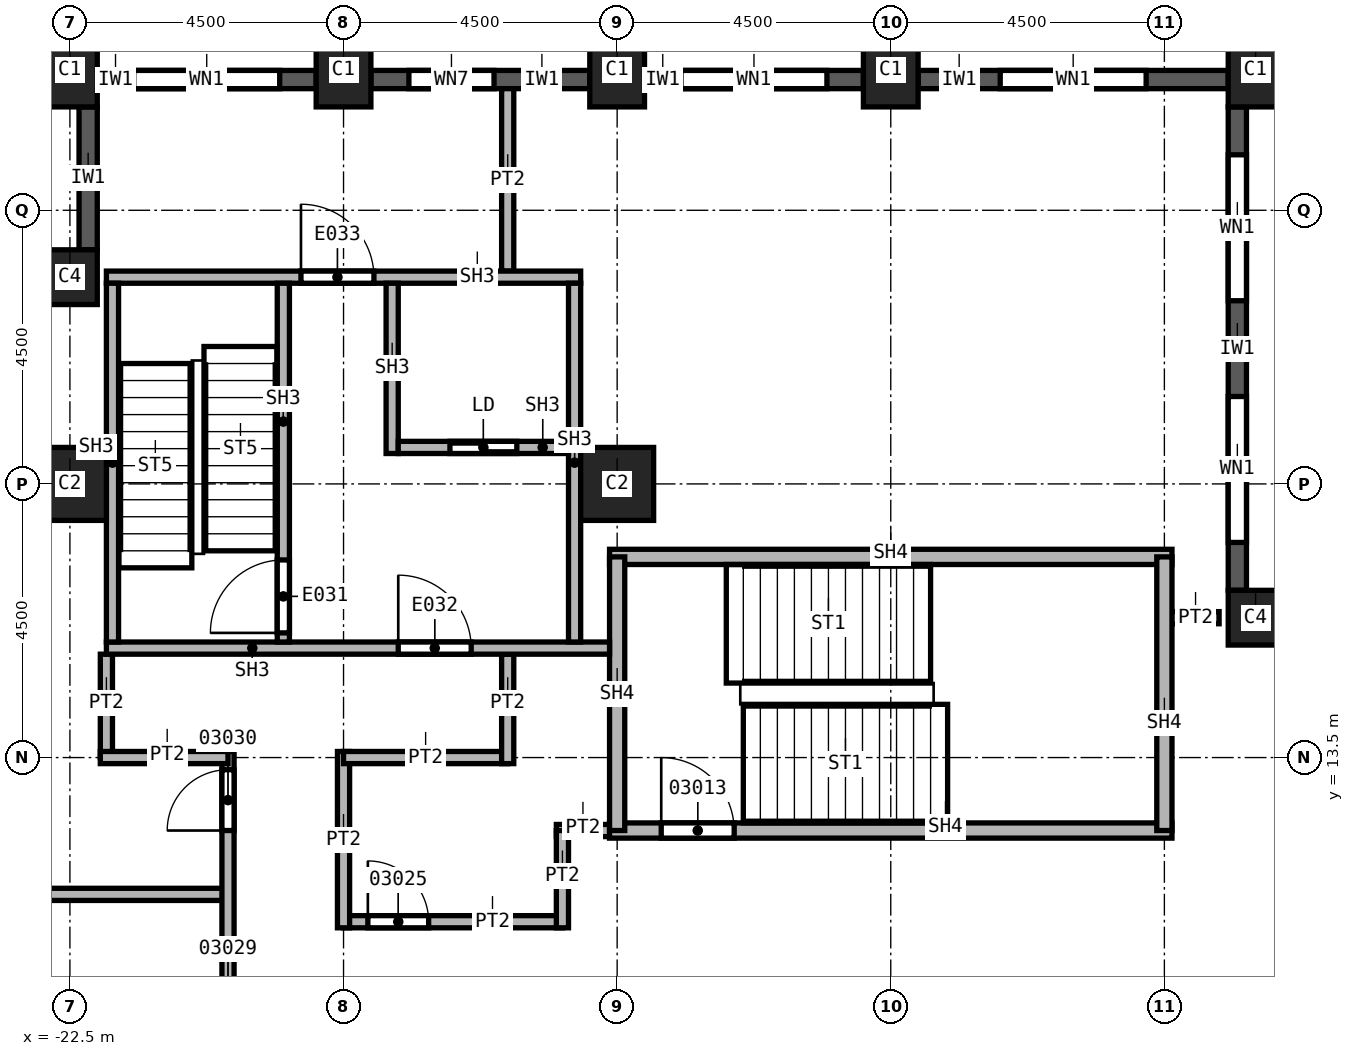
"""IFC4 building model, lengths in metres.
Left out: names, types, materials, properties, quantities, classifications, styles, units other than length and angle.
Written with IfcOpenShell. Run it as: python <this file> out.ifc"""

import sys

from ifc_helpers import new_model, si_unit, direction, frame, frame_2d, origin, origin_2d, place, context, subcontext, project, spatial, rectangle, extrude, element, fill, save


model = new_model("IFC4")
c1 = context("Model", 3, precision=1e-05, world=origin(), true_north=direction((0.0, 1.0)))
c2 = subcontext(c1, "Body", "Model", "MODEL_VIEW")
j1 = project(units=[si_unit("LENGTHUNIT", "METRE"), si_unit("PLANEANGLEUNIT", "RADIAN")], contexts=[c1])
p1 = place(None, origin())
s1 = spatial("IfcSite", under=j1, at=p1, CompositionType="ELEMENT")
p2 = place(p1, origin())
s2 = spatial("IfcBuilding", under=s1, at=p2, CompositionType="ELEMENT")
p3 = place(p2, frame((0.0, 0.0, 92.0)))
s3 = spatial("IfcBuildingStorey", under=s2, at=p3, CompositionType="ELEMENT", Elevation=92.0)
for number, where, z_axis, x_axis in (
    (1, (-13.5, 18.0, 0.0), (0.0, 0.0, 1.0), (1.0, 0.0, 0.0)),
    (2, (-22.5, 18.0, 0.0), (0.0, 0.0, 1.0), (1.0, 0.0, 0.0)),
):
    element("IfcColumn", number, at=place(p3, frame(where, z_axis=z_axis, x_axis=x_axis)), inside=s3, PredefinedType="COLUMN", context=c2, shape_type="SweptSolid", body=[
        extrude(rectangle(XDim=1.2, YDim=1.2, at=origin_2d()), origin(), (0.0, 0.0, 1.0), 3.7),
    ])
for number, where, z_axis, x_axis in (
    (3, (-3.0, 24.8, 0.0), (0.0, 0.0, 1.0), (1.0, 0.0, 0.0)),
    (4, (-9.0, 24.8, 0.0), (0.0, 0.0, 1.0), (1.0, 0.0, 0.0)),
    (5, (-13.5, 24.8, 0.0), (0.0, 0.0, 1.0), (1.0, 0.0, 0.0)),
    (6, (-18.0, 24.8, 0.0), (0.0, 0.0, 1.0), (1.0, 0.0, 0.0)),
    (7, (-22.5, 24.8, 0.0), (0.0, 0.0, 1.0), (1.0, 0.0, 0.0)),
):
    element("IfcColumn", number, at=place(p3, frame(where, z_axis=z_axis, x_axis=x_axis)), inside=s3, PredefinedType="COLUMN", context=c2, shape_type="SweptSolid", body=[
        extrude(rectangle(XDim=0.9, YDim=1.2, at=origin_2d()), origin(), (0.0, 0.0, 1.0), 3.7),
    ])
for number, where, z_axis, x_axis in (
    (8, (-3.0, 15.8, 0.0), (0.0, 0.0, 1.0), (1.0, 0.0, 0.0)),
    (9, (-22.5, 21.4, 0.0), (0.0, 0.0, 1.0), (1.0, 0.0, 0.0)),
):
    element("IfcColumn", number, at=place(p3, frame(where, z_axis=z_axis, x_axis=x_axis)), inside=s3, PredefinedType="COLUMN", context=c2, shape_type="SweptSolid", body=[
        extrude(rectangle(XDim=0.9, YDim=0.9, at=origin_2d()), origin(), (0.0, 0.0, 1.0), 3.7),
    ])
p4 = place(p3, frame((-22.2, 24.2, 0.0), z_axis=(0.0, 0.0, 1.0), x_axis=(0.0, -1.0, 0.0)))
e10 = element("IfcWall", 10, at=p4, inside=s3, PredefinedType="SOLIDWALL", context=c2, shape_type="SweptSolid", body=[
    extrude(rectangle(XDim=2.35, YDim=0.3, at=frame_2d((1.175, 0.0))), origin(), (0.0, 0.0, 1.0), 3.1),
])
p5 = place(p3, frame((-3.3, 16.25, 0.0), z_axis=(0.0, 0.0, 1.0), x_axis=(0.0, 1.0, 0.0)))
e11 = element("IfcWall", 11, at=p5, inside=s3, PredefinedType="SOLIDWALL", context=c2, shape_type="SweptSolid", body=[
    extrude(rectangle(XDim=7.95, YDim=0.3, at=frame_2d((3.975, 0.0))), origin(), (0.0, 0.0, 1.0), 3.1),
])
p6 = place(p5, frame((0.788, 0.0, 0.8)))
e12 = element("IfcOpeningElement", 12, at=p6, cuts=e11, PredefinedType="OPENING", context=c2, shape_type="SweptSolid", body=[
    extrude(rectangle(XDim=2.4, YDim=1.95, at=frame_2d((1.2, 0.975))), frame((0.0, 0.15, 0.0), z_axis=(0.0, -1.0, 0.0), x_axis=(1.0, 0.0, 0.0)), (0.0, 0.0, 1.0), 0.3),
])
p7 = place(p5, frame((4.762, 0.0, 0.8)))
e13 = element("IfcOpeningElement", 13, at=p7, cuts=e11, PredefinedType="OPENING", context=c2, shape_type="SweptSolid", body=[
    extrude(rectangle(XDim=2.4, YDim=1.95, at=frame_2d((1.2, 0.975))), frame((0.0, 0.15, 0.0), z_axis=(0.0, -1.0, 0.0), x_axis=(1.0, 0.0, 0.0)), (0.0, 0.0, 1.0), 0.3),
])
p8 = place(p3, frame((-3.45, 24.65, 0.0), z_axis=(0.0, 0.0, 1.0), x_axis=(-1.0, 0.0, 0.0)))
e14 = element("IfcWall", 14, at=p8, inside=s3, PredefinedType="SOLIDWALL", context=c2, shape_type="SweptSolid", body=[
    extrude(rectangle(XDim=5.1, YDim=0.3, at=frame_2d((2.55, 0.0))), origin(), (0.0, 0.0, 1.0), 3.1),
])
p9 = place(p8, frame((1.35, 0.0, 0.8)))
e15 = element("IfcOpeningElement", 15, at=p9, cuts=e14, PredefinedType="OPENING", context=c2, shape_type="SweptSolid", body=[
    extrude(rectangle(XDim=2.4, YDim=1.95, at=frame_2d((1.2, 0.975))), frame((0.0, 0.15, 0.0), z_axis=(0.0, -1.0, 0.0), x_axis=(1.0, 0.0, 0.0)), (0.0, 0.0, 1.0), 0.3),
])
p10 = place(p3, frame((-9.45, 24.65, 0.0), z_axis=(0.0, 0.0, 1.0), x_axis=(-1.0, 0.0, 0.0)))
e16 = element("IfcWall", 16, at=p10, inside=s3, PredefinedType="SOLIDWALL", context=c2, shape_type="SweptSolid", body=[
    extrude(rectangle(XDim=3.6, YDim=0.3, at=frame_2d((1.8, 0.0))), origin(), (0.0, 0.0, 1.0), 3.1),
])
p11 = place(p10, frame((0.6, 0.0, 0.8)))
e17 = element("IfcOpeningElement", 17, at=p11, cuts=e16, PredefinedType="OPENING", context=c2, shape_type="SweptSolid", body=[
    extrude(rectangle(XDim=2.4, YDim=1.95, at=frame_2d((1.2, 0.975))), frame((0.0, 0.15, 0.0), z_axis=(0.0, -1.0, 0.0), x_axis=(1.0, 0.0, 0.0)), (0.0, 0.0, 1.0), 0.3),
])
p12 = place(p3, frame((-13.95, 24.65, 0.0), z_axis=(0.0, 0.0, 1.0), x_axis=(-1.0, 0.0, 0.0)))
e18 = element("IfcWall", 18, at=p12, inside=s3, PredefinedType="SOLIDWALL", context=c2, shape_type="SweptSolid", body=[
    extrude(rectangle(XDim=3.6, YDim=0.3, at=frame_2d((1.8, 0.0))), origin(), (0.0, 0.0, 1.0), 3.1),
])
p13 = place(p12, frame((1.575, 0.0, 0.8)))
e19 = element("IfcOpeningElement", 19, at=p13, cuts=e18, PredefinedType="OPENING", context=c2, shape_type="SweptSolid", body=[
    extrude(rectangle(XDim=1.4, YDim=1.95, at=frame_2d((0.7, 0.975))), frame((0.0, 0.15, 0.0), z_axis=(0.0, -1.0, 0.0), x_axis=(1.0, 0.0, 0.0)), (0.0, 0.0, 1.0), 0.3),
])
p14 = place(p3, frame((-18.45, 24.65, 0.0), z_axis=(0.0, 0.0, 1.0), x_axis=(-1.0, 0.0, 0.0)))
e20 = element("IfcWall", 20, at=p14, inside=s3, PredefinedType="SOLIDWALL", context=c2, shape_type="SweptSolid", body=[
    extrude(rectangle(XDim=3.6, YDim=0.3, at=frame_2d((1.8, 0.0))), origin(), (0.0, 0.0, 1.0), 3.1),
])
p15 = place(p14, frame((0.6, 0.0, 0.8)))
e21 = element("IfcOpeningElement", 21, at=p15, cuts=e20, PredefinedType="OPENING", context=c2, shape_type="SweptSolid", body=[
    extrude(rectangle(XDim=2.4, YDim=1.95, at=frame_2d((1.2, 0.975))), frame((0.0, 0.15, 0.0), z_axis=(0.0, -1.0, 0.0), x_axis=(1.0, 0.0, 0.0)), (0.0, 0.0, 1.0), 0.3),
])
p16 = place(p3, frame((-27.1, 11.25, 0.0), z_axis=(0.0, 0.0, 1.0), x_axis=(1.0, 0.0, 0.0)))
e22 = element("IfcWall", 22, at=p16, inside=s3, PredefinedType="PARTITIONING", context=c2, shape_type="SweptSolid", body=[
    extrude(rectangle(XDim=7.2, YDim=0.2, at=frame_2d((3.6, 0.0))), origin(), (0.0, 0.0, 1.0), 3.7),
])
p17 = place(p3, frame((-21.9, 13.5, 0.0), z_axis=(0.0, 0.0, 1.0), x_axis=(0.0, 1.0, 0.0)))
e23 = element("IfcWall", 23, at=p17, inside=s3, PredefinedType="PARTITIONING", context=c2, shape_type="SweptSolid", body=[
    extrude(rectangle(XDim=1.7, YDim=0.2, at=frame_2d((0.85, 0.0))), origin(), (0.0, 0.0, 1.0), 3.7),
])
p18 = place(p3, frame((-19.9, 3.65, 0.0), z_axis=(0.0, 0.0, 1.0), x_axis=(0.0, 1.0, 0.0)))
e24 = element("IfcWall", 24, at=p18, inside=s3, PredefinedType="PARTITIONING", context=c2, shape_type="SweptSolid", body=[
    extrude(rectangle(XDim=9.95, YDim=0.2, at=frame_2d((4.975, 0.0))), origin(), (0.0, 0.0, 1.0), 3.7),
])
p19 = place(p18, frame((5.2, 0.0, 0.0)))
e25 = element("IfcOpeningElement", 25, at=p19, cuts=e24, PredefinedType="OPENING", context=c2, shape_type="SweptSolid", body=[
    extrude(rectangle(XDim=1.0, YDim=2.1, at=frame_2d((0.5, 1.05))), frame((0.0, 0.1, 0.0), z_axis=(0.0, -1.0, 0.0), x_axis=(1.0, 0.0, 0.0)), (0.0, 0.0, 1.0), 0.2),
])
p20 = place(p18, frame((8.65, 0.0, 0.0)))
e26 = element("IfcOpeningElement", 26, at=p20, cuts=e24, PredefinedType="OPENING", context=c2, shape_type="SweptSolid", body=[
    extrude(rectangle(XDim=1.0, YDim=2.1, at=frame_2d((0.5, 1.05))), frame((0.0, 0.1, 0.0), z_axis=(0.0, -1.0, 0.0), x_axis=(1.0, 0.0, 0.0)), (0.0, 0.0, 1.0), 0.2),
])
p21 = place(p3, frame((-19.9, 13.5, 0.0), z_axis=(0.0, 0.0, 1.0), x_axis=(-1.0, 0.0, 0.0)))
e27 = element("IfcWall", 27, at=p21, inside=s3, PredefinedType="PARTITIONING", context=c2, shape_type="SweptSolid", body=[
    extrude(rectangle(XDim=2.1, YDim=0.2, at=frame_2d((1.05, 0.0))), origin(), (0.0, 0.0, 1.0), 3.7),
])
p22 = place(p3, frame((-18.0, 10.8, 0.0), z_axis=(0.0, 0.0, 1.0), x_axis=(1.0, 0.0, 0.0)))
e28 = element("IfcWall", 28, at=p22, inside=s3, PredefinedType="PARTITIONING", context=c2, shape_type="SweptSolid", body=[
    extrude(rectangle(XDim=3.6, YDim=0.2, at=frame_2d((1.8, 0.0))), origin(), (0.0, 0.0, 1.0), 3.7),
])
p23 = place(p22, frame((0.4, 0.0, 0.0)))
e29 = element("IfcOpeningElement", 29, at=p23, cuts=e28, PredefinedType="OPENING", context=c2, shape_type="SweptSolid", body=[
    extrude(rectangle(XDim=1.0, YDim=2.1, at=frame_2d((0.5, 1.05))), frame((0.0, 0.1, 0.0), z_axis=(0.0, -1.0, 0.0), x_axis=(1.0, 0.0, 0.0)), (0.0, 0.0, 1.0), 0.2),
])
p24 = place(p3, frame((-18.0, 13.6, 0.0), z_axis=(0.0, 0.0, 1.0), x_axis=(0.0, -1.0, 0.0)))
e30 = element("IfcWall", 30, at=p24, inside=s3, PredefinedType="PARTITIONING", context=c2, shape_type="SweptSolid", body=[
    extrude(rectangle(XDim=2.9, YDim=0.2, at=frame_2d((1.45, 0.0))), origin(), (0.0, 0.0, 1.0), 3.7),
])
p25 = place(p3, frame((-15.3, 13.5, 0.0), z_axis=(0.0, 0.0, 1.0), x_axis=(-1.0, 0.0, 0.0)))
e31 = element("IfcWall", 31, at=p25, inside=s3, PredefinedType="PARTITIONING", context=c2, shape_type="SweptSolid", body=[
    extrude(rectangle(XDim=2.7, YDim=0.2, at=frame_2d((1.35, 0.0))), origin(), (0.0, 0.0, 1.0), 3.7),
])
p26 = place(p3, frame((-15.3, 15.2, 0.0), z_axis=(0.0, 0.0, 1.0), x_axis=(0.0, -1.0, 0.0)))
e32 = element("IfcWall", 32, at=p26, inside=s3, PredefinedType="PARTITIONING", context=c2, shape_type="SweptSolid", body=[
    extrude(rectangle(XDim=1.8, YDim=0.2, at=frame_2d((0.9, 0.0))), origin(), (0.0, 0.0, 1.0), 3.7),
])
p27 = place(p3, frame((-15.3, 24.5, 0.0), z_axis=(0.0, 0.0, 1.0), x_axis=(0.0, -1.0, 0.0)))
e33 = element("IfcWall", 33, at=p27, inside=s3, PredefinedType="PARTITIONING", context=c2, shape_type="SweptSolid", body=[
    extrude(rectangle(XDim=3.0, YDim=0.2, at=frame_2d((1.5, 0.0))), origin(), (0.0, 0.0, 1.0), 3.7),
])
p28 = place(p3, frame((-14.5, 12.3, 0.0), z_axis=(0.0, 0.0, 1.0), x_axis=(1.0, 0.0, 0.0)))
e34 = element("IfcWall", 34, at=p28, inside=s3, PredefinedType="PARTITIONING", context=c2, shape_type="SweptSolid", body=[
    extrude(rectangle(XDim=1.125, YDim=0.2, at=frame_2d((0.562, 0.0))), origin(), (0.0, 0.0, 1.0), 3.7),
])
p29 = place(p3, frame((-14.4, 10.7, 0.0), z_axis=(0.0, 0.0, 1.0), x_axis=(0.0, 1.0, 0.0)))
e35 = element("IfcWall", 35, at=p29, inside=s3, PredefinedType="PARTITIONING", context=c2, shape_type="SweptSolid", body=[
    extrude(rectangle(XDim=1.6, YDim=0.2, at=frame_2d((0.8, 0.0))), origin(), (0.0, 0.0, 1.0), 3.7),
])
p30 = place(p3, frame((-4.5, 15.8, 0.0), z_axis=(0.0, 0.0, 1.0), x_axis=(1.0, 0.0, 0.0)))
e36 = element("IfcWall", 36, at=p30, inside=s3, PredefinedType="PARTITIONING", context=c2, shape_type="SweptSolid", body=[
    extrude(rectangle(XDim=0.9, YDim=0.2, at=frame_2d((0.45, 0.0))), origin(), (0.0, 0.0, 1.0), 3.7),
])
p31 = place(p3, frame((-13.625, 12.3, 0.0), z_axis=(0.0, 0.0, 1.0), x_axis=(1.0, 0.0, 0.0)))
e37 = element("IfcWall", 37, at=p31, inside=s3, PredefinedType="SOLIDWALL", context=c2, shape_type="SweptSolid", body=[
    extrude(rectangle(XDim=9.25, YDim=0.25, at=frame_2d((4.625, 0.0))), origin(), (0.0, 0.0, 1.0), 3.7),
])
p32 = place(p31, frame((0.85, 0.0, 0.0)))
e38 = element("IfcOpeningElement", 38, at=p32, cuts=e37, PredefinedType="OPENING", context=c2, shape_type="SweptSolid", body=[
    extrude(rectangle(XDim=1.2, YDim=2.1, at=frame_2d((0.6, 1.05))), frame((0.0, 0.125, 0.0), z_axis=(0.0, -1.0, 0.0), x_axis=(1.0, 0.0, 0.0)), (0.0, 0.0, 1.0), 0.25),
])
p33 = place(p3, frame((-13.625, 16.8, 0.0), z_axis=(0.0, 0.0, 1.0), x_axis=(1.0, 0.0, 0.0)))
e39 = element("IfcWall", 39, at=p33, inside=s3, PredefinedType="SOLIDWALL", context=c2, shape_type="SweptSolid", body=[
    extrude(rectangle(XDim=9.25, YDim=0.25, at=frame_2d((4.625, 0.0))), origin(), (0.0, 0.0, 1.0), 3.7),
])
for number, where, z_axis, x_axis in (
    (40, (-13.5, 12.3, 0.0), (0.0, 0.0, 1.0), (0.0, 1.0, 0.0)),
    (41, (-4.5, 16.8, 0.0), (0.0, 0.0, 1.0), (0.0, -1.0, 0.0)),
):
    element("IfcWall", number, at=place(p3, frame(where, z_axis=z_axis, x_axis=x_axis)), inside=s3, PredefinedType="SOLIDWALL", context=c2, shape_type="SweptSolid", body=[
        extrude(rectangle(XDim=4.5, YDim=0.25, at=frame_2d((2.25, 0.0))), origin(), (0.0, 0.0, 1.0), 3.7),
    ])
p34 = place(p3, frame((-21.9, 15.3, 0.0), z_axis=(0.0, 0.0, 1.0), x_axis=(1.0, 0.0, 0.0)))
e42 = element("IfcWall", 42, at=p34, inside=s3, PredefinedType="SOLIDWALL", context=c2, shape_type="SweptSolid", body=[
    extrude(rectangle(XDim=8.275, YDim=0.2, at=frame_2d((4.137, 0.0))), origin(), (0.0, 0.0, 1.0), 3.7),
])
p35 = place(p34, frame((4.8, 0.0, 0.0)))
e43 = element("IfcOpeningElement", 43, at=p35, cuts=e42, PredefinedType="OPENING", context=c2, shape_type="SweptSolid", body=[
    extrude(rectangle(XDim=1.2, YDim=2.1, at=frame_2d((0.6, 1.05))), frame((0.0, 0.1, 0.0), z_axis=(0.0, -1.0, 0.0), x_axis=(1.0, 0.0, 0.0)), (0.0, 0.0, 1.0), 0.2),
])
p36 = place(p3, frame((-21.9, 21.4, 0.0), z_axis=(0.0, 0.0, 1.0), x_axis=(1.0, 0.0, 0.0)))
e44 = element("IfcWall", 44, at=p36, inside=s3, PredefinedType="SOLIDWALL", context=c2, shape_type="SweptSolid", body=[
    extrude(rectangle(XDim=7.8, YDim=0.2, at=frame_2d((3.9, 0.0))), origin(), (0.0, 0.0, 1.0), 3.7),
])
p37 = place(p36, frame((3.2, 0.0, 0.0)))
e45 = element("IfcOpeningElement", 45, at=p37, cuts=e44, PredefinedType="OPENING", context=c2, shape_type="SweptSolid", body=[
    extrude(rectangle(XDim=1.2, YDim=2.1, at=frame_2d((0.6, 1.05))), frame((0.0, 0.1, 0.0), z_axis=(0.0, -1.0, 0.0), x_axis=(1.0, 0.0, 0.0)), (0.0, 0.0, 1.0), 0.2),
])
for number, where, z_axis, x_axis in (
    (46, (-21.8, 15.4, 0.0), (0.0, 0.0, 1.0), (0.0, 1.0, 0.0)),
    (47, (-14.2, 15.4, 0.0), (0.0, 0.0, 1.0), (0.0, 1.0, 0.0)),
):
    element("IfcWall", number, at=place(p3, frame(where, z_axis=z_axis, x_axis=x_axis)), inside=s3, PredefinedType="SOLIDWALL", context=c2, shape_type="SweptSolid", body=[
        extrude(rectangle(XDim=5.9, YDim=0.2, at=frame_2d((2.95, 0.0))), origin(), (0.0, 0.0, 1.0), 3.7),
    ])
p38 = place(p3, frame((-18.99, 15.4, 0.0), z_axis=(0.0, 0.0, 1.0), x_axis=(0.0, 1.0, 0.0)))
e48 = element("IfcWall", 48, at=p38, inside=s3, PredefinedType="SOLIDWALL", context=c2, shape_type="SweptSolid", body=[
    extrude(rectangle(XDim=5.9, YDim=0.2, at=frame_2d((2.95, 0.0))), origin(), (0.0, 0.0, 1.0), 3.7),
])
p39 = place(p38, frame((0.15, 0.0, 0.0)))
e49 = element("IfcOpeningElement", 49, at=p39, cuts=e48, PredefinedType="OPENING", context=c2, shape_type="SweptSolid", body=[
    extrude(rectangle(XDim=1.2, YDim=2.1, at=frame_2d((0.6, 1.05))), frame((0.0, 0.1, 0.0), z_axis=(0.0, -1.0, 0.0), x_axis=(1.0, 0.0, 0.0)), (0.0, 0.0, 1.0), 0.2),
])
p40 = place(p3, frame((-17.2, 18.5, 0.0), z_axis=(0.0, 0.0, 1.0), x_axis=(0.0, 1.0, 0.0)))
e50 = element("IfcWall", 50, at=p40, inside=s3, PredefinedType="SOLIDWALL", context=c2, shape_type="SweptSolid", body=[
    extrude(rectangle(XDim=2.8, YDim=0.2, at=frame_2d((1.4, 0.0))), origin(), (0.0, 0.0, 1.0), 3.7),
])
p41 = place(p3, frame((-17.1, 18.6, 0.0), z_axis=(0.0, 0.0, 1.0), x_axis=(1.0, 0.0, 0.0)))
e51 = element("IfcWall", 51, at=p41, inside=s3, PredefinedType="SOLIDWALL", context=c2, shape_type="SweptSolid", body=[
    extrude(rectangle(XDim=2.8, YDim=0.2, at=frame_2d((1.4, 0.0))), origin(), (0.0, 0.0, 1.0), 3.7),
])
p42 = place(p41, frame((0.85, 0.0, 0.0)))
e52 = element("IfcOpeningElement", 52, at=p42, cuts=e51, PredefinedType="OPENING", context=c2, shape_type="SweptSolid", body=[
    extrude(rectangle(XDim=1.1, YDim=2.1, at=frame_2d((0.55, 1.05))), frame((0.0, 0.1, 0.0), z_axis=(0.0, -1.0, 0.0), x_axis=(1.0, 0.0, 0.0)), (0.0, 0.0, 1.0), 0.2),
])
p43 = place(p6, origin())
e53 = element("IfcWindow", 53, at=p43, inside=s3, PartitioningType="SINGLE_PANEL", PredefinedType="WINDOW", context=c2, shape_type="SweptSolid", body=[
    extrude(rectangle(XDim=2.4, YDim=1.95, at=frame_2d((1.2, 0.975))), frame((0.0, 0.03, 0.0), z_axis=(0.0, -1.0, 0.0), x_axis=(1.0, 0.0, 0.0)), (0.0, 0.0, 1.0), 0.06),
])
fill(e12, e53)
p44 = place(p7, origin())
e54 = element("IfcWindow", 54, at=p44, inside=s3, PartitioningType="SINGLE_PANEL", PredefinedType="WINDOW", context=c2, shape_type="SweptSolid", body=[
    extrude(rectangle(XDim=2.4, YDim=1.95, at=frame_2d((1.2, 0.975))), frame((0.0, 0.03, 0.0), z_axis=(0.0, -1.0, 0.0), x_axis=(1.0, 0.0, 0.0)), (0.0, 0.0, 1.0), 0.06),
])
fill(e13, e54)
p45 = place(p9, origin())
e55 = element("IfcWindow", 55, at=p45, inside=s3, PartitioningType="SINGLE_PANEL", PredefinedType="WINDOW", context=c2, shape_type="SweptSolid", body=[
    extrude(rectangle(XDim=2.4, YDim=1.95, at=frame_2d((1.2, 0.975))), frame((0.0, 0.03, 0.0), z_axis=(0.0, -1.0, 0.0), x_axis=(1.0, 0.0, 0.0)), (0.0, 0.0, 1.0), 0.06),
])
fill(e15, e55)
p46 = place(p11, origin())
e56 = element("IfcWindow", 56, at=p46, inside=s3, PartitioningType="SINGLE_PANEL", PredefinedType="WINDOW", context=c2, shape_type="SweptSolid", body=[
    extrude(rectangle(XDim=2.4, YDim=1.95, at=frame_2d((1.2, 0.975))), frame((0.0, 0.03, 0.0), z_axis=(0.0, -1.0, 0.0), x_axis=(1.0, 0.0, 0.0)), (0.0, 0.0, 1.0), 0.06),
])
fill(e17, e56)
p47 = place(p15, origin())
e57 = element("IfcWindow", 57, at=p47, inside=s3, PartitioningType="SINGLE_PANEL", PredefinedType="WINDOW", context=c2, shape_type="SweptSolid", body=[
    extrude(rectangle(XDim=2.4, YDim=1.95, at=frame_2d((1.2, 0.975))), frame((0.0, 0.03, 0.0), z_axis=(0.0, -1.0, 0.0), x_axis=(1.0, 0.0, 0.0)), (0.0, 0.0, 1.0), 0.06),
])
fill(e21, e57)
p48 = place(p32, origin())
e58 = element("IfcDoor", 58, at=p48, inside=s3, OperationType="SINGLE_SWING_RIGHT", PredefinedType="DOOR", context=c2, shape_type="SweptSolid", body=[
    extrude(rectangle(XDim=1.2, YDim=2.1, at=frame_2d((0.6, 1.05))), frame((0.0, 0.025, 0.0), z_axis=(0.0, -1.0, 0.0), x_axis=(1.0, 0.0, 0.0)), (0.0, 0.0, 1.0), 0.05),
])
fill(e38, e58)
p49 = place(p23, origin())
e59 = element("IfcDoor", 59, at=p49, inside=s3, OperationType="SINGLE_SWING_RIGHT", PredefinedType="DOOR", context=c2, shape_type="SweptSolid", body=[
    extrude(rectangle(XDim=1.0, YDim=2.1, at=frame_2d((0.5, 1.05))), frame((0.0, 0.025, 0.0), z_axis=(0.0, -1.0, 0.0), x_axis=(1.0, 0.0, 0.0)), (0.0, 0.0, 1.0), 0.05),
])
fill(e29, e59)
p50 = place(p20, origin())
e60 = element("IfcDoor", 60, at=p50, inside=s3, OperationType="SINGLE_SWING_LEFT", PredefinedType="DOOR", context=c2, shape_type="SweptSolid", body=[
    extrude(rectangle(XDim=1.0, YDim=2.1, at=frame_2d((0.5, 1.05))), frame((0.0, 0.025, 0.0), z_axis=(0.0, -1.0, 0.0), x_axis=(1.0, 0.0, 0.0)), (0.0, 0.0, 1.0), 0.05),
])
fill(e26, e60)
p51 = place(p39, origin())
e61 = element("IfcDoor", 61, at=p51, inside=s3, OperationType="SINGLE_SWING_LEFT", PredefinedType="DOOR", context=c2, shape_type="SweptSolid", body=[
    extrude(rectangle(XDim=1.2, YDim=2.1, at=frame_2d((0.6, 1.05))), frame((0.0, 0.025, 0.0), z_axis=(0.0, -1.0, 0.0), x_axis=(1.0, 0.0, 0.0)), (0.0, 0.0, 1.0), 0.05),
])
fill(e49, e61)
p52 = place(p42, origin())
e62 = element("IfcDoor", 62, at=p52, inside=s3, OperationType="SLIDING_TO_LEFT", PredefinedType="DOOR", context=c2, shape_type="SweptSolid", body=[
    extrude(rectangle(XDim=1.1, YDim=2.1, at=frame_2d((0.55, 1.05))), frame((0.0, 0.025, 0.0), z_axis=(0.0, -1.0, 0.0), x_axis=(1.0, 0.0, 0.0)), (0.0, 0.0, 1.0), 0.05),
])
fill(e52, e62)
p53 = place(p35, origin())
e63 = element("IfcDoor", 63, at=p53, inside=s3, OperationType="SINGLE_SWING_RIGHT", PredefinedType="DOOR", context=c2, shape_type="SweptSolid", body=[
    extrude(rectangle(XDim=1.2, YDim=2.1, at=frame_2d((0.6, 1.05))), frame((0.0, 0.025, 0.0), z_axis=(0.0, -1.0, 0.0), x_axis=(1.0, 0.0, 0.0)), (0.0, 0.0, 1.0), 0.05),
])
fill(e43, e63)
p54 = place(p37, origin())
e64 = element("IfcDoor", 64, at=p54, inside=s3, OperationType="SINGLE_SWING_LEFT", PredefinedType="DOOR", context=c2, shape_type="SweptSolid", body=[
    extrude(rectangle(XDim=1.2, YDim=2.1, at=frame_2d((0.6, 1.05))), frame((0.0, 0.025, 0.0), z_axis=(0.0, -1.0, 0.0), x_axis=(1.0, 0.0, 0.0)), (0.0, 0.0, 1.0), 0.05),
])
fill(e45, e64)
p55 = place(p13, origin())
e65 = element("IfcWindow", 65, at=p55, inside=s3, PartitioningType="SINGLE_PANEL", PredefinedType="WINDOW", context=c2, shape_type="SweptSolid", body=[
    extrude(rectangle(XDim=1.4, YDim=1.95, at=frame_2d((0.7, 0.975))), frame((0.0, 0.03, 0.0), z_axis=(0.0, -1.0, 0.0), x_axis=(1.0, 0.0, 0.0)), (0.0, 0.0, 1.0), 0.06),
])
fill(e19, e65)
save(model, sys.argv[1])
